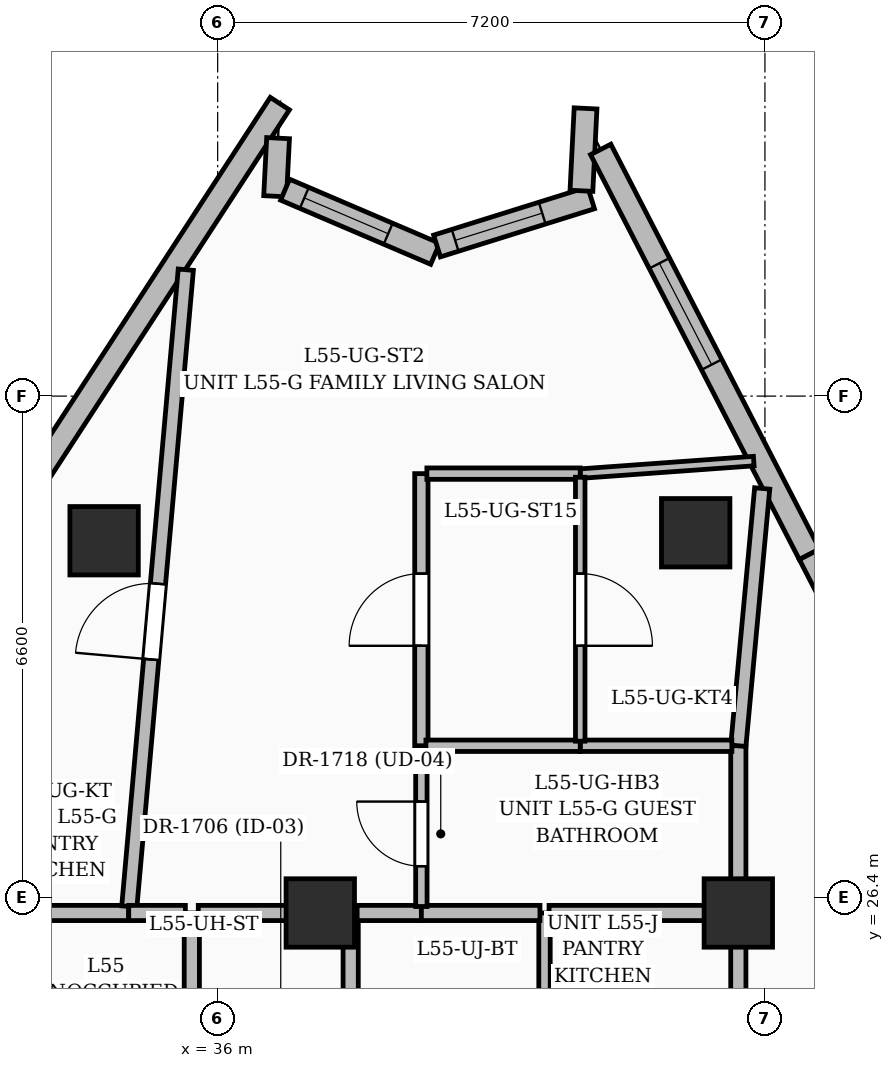
"""IFC4 building model, lengths in metres.
Left out: names, types, materials, properties, quantities, classifications, styles, units other than length and angle.
Written with IfcOpenShell. Run it as: python <this file> out.ifc"""

import sys

from ifc_helpers import new_model, si_unit, direction, frame, frame_2d, origin, origin_2d, place, context, subcontext, project, spatial, rectangle, extrude, element, fill, save


model = new_model("IFC4")
c1 = context("Model", 3, precision=1e-05, world=origin(), true_north=direction((0.0, 1.0)))
c2 = subcontext(c1, "Body", "Model", "MODEL_VIEW")
j1 = project(units=[si_unit("LENGTHUNIT", "METRE"), si_unit("PLANEANGLEUNIT", "RADIAN")], contexts=[c1])
p1 = place(None, origin())
s1 = spatial("IfcSite", under=j1, at=p1, CompositionType="ELEMENT")
p2 = place(p1, origin())
s2 = spatial("IfcBuilding", under=s1, at=p2, CompositionType="ELEMENT")
p3 = place(p2, frame((0.0, 0.0, 214.5)))
s3 = spatial("IfcBuildingStorey", under=s2, at=p3, CompositionType="ELEMENT", Elevation=214.5)
for number, where, z_axis, x_axis in (
    (1, (42.85, 26.2, 0.0), (0.0, 0.0, 1.0), (1.0, 0.0, 0.0)),
    (2, (37.35, 26.2, 0.0), (0.0, 0.0, 1.0), (1.0, 0.0, 0.0)),
    (3, (42.289, 31.202, 0.0), (0.0, 0.0, 1.0), (1.0, 0.0, 0.0)),
    (4, (34.506, 31.097, 0.0), (0.0, 0.0, 1.0), (1.0, 0.0, 0.0)),
):
    element("IfcColumn", number, at=place(p3, frame(where, z_axis=z_axis, x_axis=x_axis)), inside=s3, PredefinedType="COLUMN", context=c2, shape_type="SweptSolid", body=[
        extrude(rectangle(XDim=0.9, YDim=0.9, at=origin_2d()), origin(), (0.0, 0.0, 1.0), 3.75),
    ])
p4 = place(p3, frame((33.174, 31.251, 0.0), z_axis=(0.0, 0.0, 1.0), x_axis=(0.545624217243, 0.838029959821, 0.0)))
e5 = element("IfcWall", 5, at=p4, inside=s3, PredefinedType="SOLIDWALL", context=c2, shape_type="SweptSolid", body=[
    extrude(rectangle(XDim=6.679, YDim=0.3, at=frame_2d((3.339, 0.0))), origin(), (0.0, 0.0, 1.0), 3.5),
])
p5 = place(p3, frame((36.795, 36.394, 0.0), z_axis=(0.0, 0.0, 1.0), x_axis=(-0.051035290984, -0.998696850438, 0.0)))
e6 = element("IfcWall", 6, at=p5, inside=s3, PredefinedType="SOLIDWALL", context=c2, shape_type="SweptSolid", body=[
    extrude(rectangle(XDim=0.765, YDim=0.3, at=frame_2d((0.383, 0.0))), origin(), (0.0, 0.0, 1.0), 3.5),
])
p6 = place(p3, frame((36.887, 35.716, 0.0), z_axis=(0.0, 0.0, 1.0), x_axis=(0.919567916171, -0.392931097711, 0.0)))
e7 = element("IfcWall", 7, at=p6, inside=s3, PredefinedType="SOLIDWALL", context=c2, shape_type="SweptSolid", body=[
    extrude(rectangle(XDim=2.147, YDim=0.3, at=frame_2d((1.074, 0.0))), origin(), (0.0, 0.0, 1.0), 3.5),
])
p7 = place(p6, frame((0.275, 0.0, 0.8)))
e8 = element("IfcOpeningElement", 8, at=p7, cuts=e7, PredefinedType="OPENING", context=c2, shape_type="SweptSolid", body=[
    extrude(rectangle(XDim=1.2, YDim=1.8, at=frame_2d((0.6, 0.9))), frame((0.0, 0.16, 0.0), z_axis=(0.0, -1.0, 0.0), x_axis=(1.0, 0.0, 0.0)), (0.0, 0.0, 1.0), 0.32),
])
p8 = place(p3, frame((38.886, 34.975, 0.0), z_axis=(0.0, 0.0, 1.0), x_axis=(0.954524975295, 0.298130963736, 0.0)))
e9 = element("IfcWall", 9, at=p8, inside=s3, PredefinedType="SOLIDWALL", context=c2, shape_type="SweptSolid", body=[
    extrude(rectangle(XDim=2.124, YDim=0.3, at=frame_2d((1.062, 0.0))), origin(), (0.0, 0.0, 1.0), 3.5),
])
p9 = place(p8, frame((0.25, 0.0, 0.8)))
e10 = element("IfcOpeningElement", 10, at=p9, cuts=e9, PredefinedType="OPENING", context=c2, shape_type="SweptSolid", body=[
    extrude(rectangle(XDim=1.2, YDim=1.8, at=frame_2d((0.6, 0.9))), frame((0.0, 0.16, 0.0), z_axis=(0.0, -1.0, 0.0), x_axis=(1.0, 0.0, 0.0)), (0.0, 0.0, 1.0), 0.32),
])
p10 = place(p3, frame((40.786, 35.701, 0.0), z_axis=(0.0, 0.0, 1.0), x_axis=(0.05016199642, 0.998741094636, 0.0)))
e11 = element("IfcWall", 11, at=p10, inside=s3, PredefinedType="SOLIDWALL", context=c2, shape_type="SweptSolid", body=[
    extrude(rectangle(XDim=1.085, YDim=0.3, at=frame_2d((0.543, 0.0))), origin(), (0.0, 0.0, 1.0), 3.5),
])
p11 = place(p3, frame((41.039, 36.245, 0.0), z_axis=(0.0, 0.0, 1.0), x_axis=(0.458292150172, -0.888801611773, 0.0)))
e12 = element("IfcWall", 12, at=p11, inside=s3, PredefinedType="SOLIDWALL", context=c2, shape_type="SweptSolid", body=[
    extrude(rectangle(XDim=5.993, YDim=0.3, at=frame_2d((2.997, 0.0))), origin(), (0.0, 0.0, 1.0), 3.5),
])
p12 = place(p11, frame((1.685, 0.0, 0.6)))
e13 = element("IfcOpeningElement", 13, at=p12, cuts=e12, PredefinedType="OPENING", context=c2, shape_type="SweptSolid", body=[
    extrude(rectangle(XDim=1.5, YDim=2.1, at=frame_2d((0.75, 1.05))), frame((0.0, 0.16, 0.0), z_axis=(0.0, -1.0, 0.0), x_axis=(1.0, 0.0, 0.0)), (0.0, 0.0, 1.0), 0.32),
])
p13 = place(p3, frame((43.786, 30.918, 0.0), z_axis=(0.0, 0.0, 1.0), x_axis=(0.458349099599, -0.888772244671, 0.0)))
e14 = element("IfcWall", 14, at=p13, inside=s3, PredefinedType="SOLIDWALL", context=c2, shape_type="SweptSolid", body=[
    extrude(rectangle(XDim=6.583, YDim=0.3, at=frame_2d((3.292, 0.0))), origin(), (0.0, 0.0, 1.0), 3.5),
])
p14 = place(p13, frame((2.675, 0.0, 0.8)))
e15 = element("IfcOpeningElement", 15, at=p14, cuts=e14, PredefinedType="OPENING", context=c2, shape_type="SweptSolid", body=[
    extrude(rectangle(XDim=1.2, YDim=1.8, at=frame_2d((0.6, 0.9))), frame((0.0, 0.16, 0.0), z_axis=(0.0, -1.0, 0.0), x_axis=(1.0, 0.0, 0.0)), (0.0, 0.0, 1.0), 0.32),
])
p15 = place(p3, frame((33.485, 26.2, 0.0), z_axis=(0.0, 0.0, 1.0), x_axis=(1.0, 0.0, 0.0)))
e16 = element("IfcWall", 16, at=p15, inside=s3, PredefinedType="PARTITIONING", context=c2, shape_type="SweptSolid", body=[
    extrude(rectangle(XDim=1.345, YDim=0.2, at=frame_2d((0.672, 0.0))), origin(), (0.0, 0.0, 1.0), 2.859),
])
p16 = place(p3, frame((34.838, 26.285, 0.0), z_axis=(0.0, 0.0, 1.0), x_axis=(0.088352923437, 0.996089233412, 0.0)))
e17 = element("IfcWall", 17, at=p16, inside=s3, PredefinedType="PARTITIONING", context=c2, shape_type="SweptSolid", body=[
    extrude(rectangle(XDim=8.411, YDim=0.2, at=frame_2d((4.206, 0.0))), origin(), (0.0, 0.0, 1.0), 2.685),
])
p17 = place(p16, frame((3.264, 0.0, 0.0)))
e18 = element("IfcOpeningElement", 18, at=p17, cuts=e17, PredefinedType="OPENING", context=c2, shape_type="SweptSolid", body=[
    extrude(rectangle(XDim=1.0, YDim=2.2, at=frame_2d((0.5, 1.1))), frame((0.0, 0.11, 0.0), z_axis=(0.0, -1.0, 0.0), x_axis=(1.0, 0.0, 0.0)), (0.0, 0.0, 1.0), 0.22),
])
p18 = place(p3, frame((35.66, 26.2, 0.0), z_axis=(0.0, 0.0, 1.0), x_axis=(0.0, -1.0, 0.0)))
e19 = element("IfcWall", 19, at=p18, inside=s3, PredefinedType="PARTITIONING", context=c2, shape_type="SweptSolid", body=[
    extrude(rectangle(XDim=1.8, YDim=0.2, at=frame_2d((0.9, 0.0))), origin(), (0.0, 0.0, 1.0), 3.5),
])
p19 = place(p3, frame((37.75, 24.485, 0.0), z_axis=(0.0, 0.0, 1.0), x_axis=(0.0, 1.0, 0.0)))
e20 = element("IfcWall", 20, at=p19, inside=s3, PredefinedType="PARTITIONING", context=c2, shape_type="SweptSolid", body=[
    extrude(rectangle(XDim=1.715, YDim=0.2, at=frame_2d((0.857, 0.0))), origin(), (0.0, 0.0, 1.0), 2.685),
])
p20 = place(p3, frame((37.665, 26.2, 0.0), z_axis=(0.0, 0.0, 1.0), x_axis=(-1.0, 0.0, 0.0)))
e21 = element("IfcWall", 21, at=p20, inside=s3, PredefinedType="PARTITIONING", context=c2, shape_type="SweptSolid", body=[
    extrude(rectangle(XDim=1.92, YDim=0.2, at=frame_2d((0.96, 0.0))), origin(), (0.0, 0.0, 1.0), 3.5),
])
p21 = place(p3, frame((35.575, 26.2, 0.0), z_axis=(0.0, 0.0, 1.0), x_axis=(-1.0, 0.0, 0.0)))
e22 = element("IfcWall", 22, at=p21, inside=s3, PredefinedType="PARTITIONING", context=c2, shape_type="SweptSolid", body=[
    extrude(rectangle(XDim=0.745, YDim=0.2, at=frame_2d((0.373, 0.0))), origin(), (0.0, 0.0, 1.0), 3.5),
])
p22 = place(p3, frame((40.3, 26.2, 0.0), z_axis=(0.0, 0.0, 1.0), x_axis=(0.0, -1.0, 0.0)))
e23 = element("IfcWall", 23, at=p22, inside=s3, PredefinedType="PARTITIONING", context=c2, shape_type="SweptSolid", body=[
    extrude(rectangle(XDim=1.972, YDim=0.15, at=frame_2d((0.986, 0.0))), origin(), (0.0, 0.0, 1.0), 2.685),
])
p23 = place(p3, frame((42.85, 24.228, 0.0), z_axis=(0.0, 0.0, 1.0), x_axis=(0.0, 1.0, 0.0)))
e24 = element("IfcWall", 24, at=p23, inside=s3, PredefinedType="PARTITIONING", context=c2, shape_type="SweptSolid", body=[
    extrude(rectangle(XDim=1.972, YDim=0.2, at=frame_2d((0.986, 0.0))), origin(), (0.0, 0.0, 1.0), 2.685),
])
p24 = place(p3, frame((42.765, 26.2, 0.0), z_axis=(0.0, 0.0, 1.0), x_axis=(-1.0, 0.0, 0.0)))
e25 = element("IfcWall", 25, at=p24, inside=s3, PredefinedType="PARTITIONING", context=c2, shape_type="SweptSolid", body=[
    extrude(rectangle(XDim=2.405, YDim=0.2, at=frame_2d((1.202, 0.0))), origin(), (0.0, 0.0, 1.0), 2.685),
])
p25 = place(p3, frame((38.68, 26.2, 0.0), z_axis=(0.0, 0.0, 1.0), x_axis=(-1.0, 0.0, 0.0)))
e26 = element("IfcWall", 26, at=p25, inside=s3, PredefinedType="PARTITIONING", context=c2, shape_type="SweptSolid", body=[
    extrude(rectangle(XDim=0.845, YDim=0.2, at=frame_2d((0.422, 0.0))), origin(), (0.0, 0.0, 1.0), 2.685),
])
p26 = place(p3, frame((40.24, 26.2, 0.0), z_axis=(0.0, 0.0, 1.0), x_axis=(-1.0, 0.0, 0.0)))
e27 = element("IfcWall", 27, at=p26, inside=s3, PredefinedType="PARTITIONING", context=c2, shape_type="SweptSolid", body=[
    extrude(rectangle(XDim=1.56, YDim=0.2, at=frame_2d((0.78, 0.0))), origin(), (0.0, 0.0, 1.0), 2.685),
])
p27 = place(p3, frame((42.85, 28.4, 0.0), z_axis=(0.0, 0.0, 1.0), x_axis=(0.0, -1.0, 0.0)))
e28 = element("IfcWall", 28, at=p27, inside=s3, PredefinedType="PARTITIONING", context=c2, shape_type="SweptSolid", body=[
    extrude(rectangle(XDim=2.2, YDim=0.2, at=frame_2d((1.1, 0.0))), origin(), (0.0, 0.0, 1.0), 2.685),
])
p28 = place(p3, frame((43.164, 31.785, 0.0), z_axis=(0.0, 0.0, 1.0), x_axis=(-0.092355124874, -0.995726132483, 0.0)))
e29 = element("IfcWall", 29, at=p28, inside=s3, PredefinedType="PARTITIONING", context=c2, shape_type="SweptSolid", body=[
    extrude(rectangle(XDim=3.4, YDim=0.2, at=frame_2d((1.7, 0.0))), origin(), (0.0, 0.0, 1.0), 2.685),
])
p29 = place(p3, frame((38.68, 26.285, 0.0), z_axis=(0.0, 0.0, 1.0), x_axis=(0.0, 1.0, 0.0)))
e30 = element("IfcWall", 30, at=p29, inside=s3, PredefinedType="PARTITIONING", context=c2, shape_type="SweptSolid", body=[
    extrude(rectangle(XDim=2.115, YDim=0.15, at=frame_2d((1.058, 0.0))), origin(), (0.0, 0.0, 1.0), 2.685),
])
p30 = place(p29, frame((0.531, 0.0, 0.0)))
e31 = element("IfcOpeningElement", 31, at=p30, cuts=e30, PredefinedType="OPENING", context=c2, shape_type="SweptSolid", body=[
    extrude(rectangle(XDim=0.85, YDim=2.1, at=frame_2d((0.425, 1.05))), frame((0.0, 0.085, 0.0), z_axis=(0.0, -1.0, 0.0), x_axis=(1.0, 0.0, 0.0)), (0.0, 0.0, 1.0), 0.17),
])
p31 = place(p3, frame((40.77, 31.98, 0.0), z_axis=(0.0, 0.0, 1.0), x_axis=(0.997397150256, 0.072103568984, 0.0)))
e32 = element("IfcWall", 32, at=p31, inside=s3, PredefinedType="PARTITIONING", context=c2, shape_type="SweptSolid", body=[
    extrude(rectangle(XDim=2.289, YDim=0.125, at=frame_2d((1.145, 0.0))), origin(), (0.0, 0.0, 1.0), 3.5),
])
p32 = place(p3, frame((38.68, 28.4, 0.0), z_axis=(0.0, 0.0, 1.0), x_axis=(0.0, 1.0, 0.0)))
e33 = element("IfcWall", 33, at=p32, inside=s3, PredefinedType="PARTITIONING", context=c2, shape_type="SweptSolid", body=[
    extrude(rectangle(XDim=3.58, YDim=0.175, at=frame_2d((1.79, 0.0))), origin(), (0.0, 0.0, 1.0), 2.82),
])
p33 = place(p32, frame((1.315, 0.0, 0.0)))
e34 = element("IfcOpeningElement", 34, at=p33, cuts=e33, PredefinedType="OPENING", context=c2, shape_type="SweptSolid", body=[
    extrude(rectangle(XDim=0.95, YDim=2.2, at=frame_2d((0.475, 1.1))), frame((0.0, 0.097, 0.0), z_axis=(0.0, -1.0, 0.0), x_axis=(1.0, 0.0, 0.0)), (0.0, 0.0, 1.0), 0.195),
])
p34 = place(p3, frame((38.752, 31.98, 0.0), z_axis=(0.0, 0.0, 1.0), x_axis=(1.0, 0.0, 0.0)))
e35 = element("IfcWall", 35, at=p34, inside=s3, PredefinedType="PARTITIONING", context=c2, shape_type="SweptSolid", body=[
    extrude(rectangle(XDim=2.018, YDim=0.15, at=frame_2d((1.009, 0.0))), origin(), (0.0, 0.0, 1.0), 3.5),
])
p35 = place(p3, frame((42.765, 28.4, 0.0), z_axis=(0.0, 0.0, 1.0), x_axis=(-1.0, 0.0, 0.0)))
e36 = element("IfcWall", 36, at=p35, inside=s3, PredefinedType="PARTITIONING", context=c2, shape_type="SweptSolid", body=[
    extrude(rectangle(XDim=1.995, YDim=0.15, at=frame_2d((0.998, 0.0))), origin(), (0.0, 0.0, 1.0), 2.685),
])
p36 = place(p3, frame((40.77, 28.4, 0.0), z_axis=(0.0, 0.0, 1.0), x_axis=(-1.0, 0.0, 0.0)))
e37 = element("IfcWall", 37, at=p36, inside=s3, PredefinedType="PARTITIONING", context=c2, shape_type="SweptSolid", body=[
    extrude(rectangle(XDim=2.03, YDim=0.15, at=frame_2d((1.015, 0.0))), origin(), (0.0, 0.0, 1.0), 3.5),
])
p37 = place(p3, frame((40.77, 31.933, 0.0), z_axis=(0.0, 0.0, 1.0), x_axis=(0.0, -1.0, 0.0)))
e38 = element("IfcWall", 38, at=p37, inside=s3, PredefinedType="PARTITIONING", context=c2, shape_type="SweptSolid", body=[
    extrude(rectangle(XDim=3.473, YDim=0.125, at=frame_2d((1.736, 0.0))), origin(), (0.0, 0.0, 1.0), 2.82),
])
p38 = place(p37, frame((1.268, 0.0, 0.0)))
e39 = element("IfcOpeningElement", 39, at=p38, cuts=e38, PredefinedType="OPENING", context=c2, shape_type="SweptSolid", body=[
    extrude(rectangle(XDim=0.95, YDim=2.2, at=frame_2d((0.475, 1.1))), frame((0.0, 0.072, 0.0), z_axis=(0.0, -1.0, 0.0), x_axis=(1.0, 0.0, 0.0)), (0.0, 0.0, 1.0), 0.145),
])
p39 = place(p7, origin())
e40 = element("IfcWindow", 40, at=p39, inside=s3, PartitioningType="SINGLE_PANEL", PredefinedType="WINDOW", context=c2, shape_type="SweptSolid", body=[
    extrude(rectangle(XDim=1.2, YDim=1.8, at=frame_2d((0.6, 0.9))), frame((0.0, 0.03, 0.0), z_axis=(0.0, -1.0, 0.0), x_axis=(1.0, 0.0, 0.0)), (0.0, 0.0, 1.0), 0.06),
])
fill(e8, e40)
p40 = place(p9, origin())
e41 = element("IfcWindow", 41, at=p40, inside=s3, PartitioningType="SINGLE_PANEL", PredefinedType="WINDOW", context=c2, shape_type="SweptSolid", body=[
    extrude(rectangle(XDim=1.2, YDim=1.8, at=frame_2d((0.6, 0.9))), frame((0.0, 0.03, 0.0), z_axis=(0.0, -1.0, 0.0), x_axis=(1.0, 0.0, 0.0)), (0.0, 0.0, 1.0), 0.06),
])
fill(e10, e41)
p41 = place(p12, origin())
e42 = element("IfcWindow", 42, at=p41, inside=s3, PartitioningType="SINGLE_PANEL", PredefinedType="WINDOW", context=c2, shape_type="SweptSolid", body=[
    extrude(rectangle(XDim=1.5, YDim=2.1, at=frame_2d((0.75, 1.05))), frame((0.0, 0.03, 0.0), z_axis=(0.0, -1.0, 0.0), x_axis=(1.0, 0.0, 0.0)), (0.0, 0.0, 1.0), 0.06),
])
fill(e13, e42)
p42 = place(p38, origin())
e43 = element("IfcDoor", 43, at=p42, inside=s3, OperationType="SINGLE_SWING_RIGHT", PredefinedType="DOOR", context=c2, shape_type="SweptSolid", body=[
    extrude(rectangle(XDim=0.95, YDim=2.2, at=frame_2d((0.475, 1.1))), frame((0.0, 0.025, 0.0), z_axis=(0.0, -1.0, 0.0), x_axis=(1.0, 0.0, 0.0)), (0.0, 0.0, 1.0), 0.05),
])
fill(e39, e43)
p43 = place(p33, origin())
e44 = element("IfcDoor", 44, at=p43, inside=s3, OperationType="SINGLE_SWING_LEFT", PredefinedType="DOOR", context=c2, shape_type="SweptSolid", body=[
    extrude(rectangle(XDim=0.95, YDim=2.2, at=frame_2d((0.475, 1.1))), frame((0.0, 0.025, 0.0), z_axis=(0.0, -1.0, 0.0), x_axis=(1.0, 0.0, 0.0)), (0.0, 0.0, 1.0), 0.05),
])
fill(e34, e44)
p44 = place(p30, origin())
e45 = element("IfcDoor", 45, at=p44, inside=s3, OperationType="SINGLE_SWING_RIGHT", PredefinedType="DOOR", context=c2, shape_type="SweptSolid", body=[
    extrude(rectangle(XDim=0.85, YDim=2.1, at=frame_2d((0.425, 1.05))), frame((0.0, 0.025, 0.0), z_axis=(0.0, -1.0, 0.0), x_axis=(1.0, 0.0, 0.0)), (0.0, 0.0, 1.0), 0.05),
])
fill(e31, e45)
p45 = place(p17, origin())
e46 = element("IfcDoor", 46, at=p45, inside=s3, OperationType="SINGLE_SWING_LEFT", PredefinedType="DOOR", context=c2, shape_type="SweptSolid", body=[
    extrude(rectangle(XDim=1.0, YDim=2.2, at=frame_2d((0.5, 1.1))), frame((0.0, 0.025, 0.0), z_axis=(0.0, -1.0, 0.0), x_axis=(1.0, 0.0, 0.0)), (0.0, 0.0, 1.0), 0.05),
])
fill(e18, e46)
save(model, sys.argv[1])
